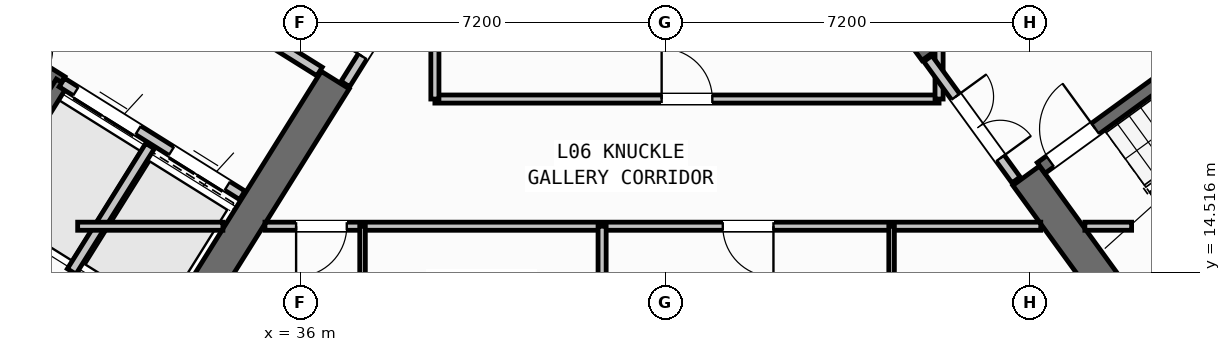
"""IFC4 building model, lengths in metres.
Left out: names, types, materials, properties, quantities, classifications, styles, units other than length and angle.
Written with IfcOpenShell. Run it as: python <this file> out.ifc"""

import sys

from ifc_helpers import new_model, si_unit, direction, frame, frame_2d, origin, place, context, subcontext, project, spatial, rectangle, extrude, source, transform, mapped, element, fill, save


model = new_model("IFC4")
c1 = context("Model", 3, precision=1e-05, world=origin(), true_north=direction((0.0, 1.0)))
c2 = subcontext(c1, "Body", "Model", "MODEL_VIEW")
j1 = project(units=[si_unit("LENGTHUNIT", "METRE"), si_unit("PLANEANGLEUNIT", "RADIAN")], contexts=[c1])
p1 = place(None, origin())
s1 = spatial("IfcSite", under=j1, at=p1, CompositionType="ELEMENT")
p2 = place(p1, origin())
s2 = spatial("IfcBuilding", under=s1, at=p2, CompositionType="ELEMENT")
p3 = place(p2, frame((0.0, 0.0, 27.6)))
s3 = spatial("IfcBuildingStorey", under=s2, at=p3, CompositionType="ELEMENT", Elevation=27.6)
p4 = place(p3, frame((33.409, 12.45, 0.0), z_axis=(0.0, 0.0, 1.0), x_axis=(-0.848051132073, 0.529914405721, 0.0)))
e1 = element("IfcWall", 1, at=p4, inside=s3, PredefinedType="SHEAR", context=c2, shape_type="SweptSolid", body=[
    extrude(rectangle(XDim=13.24, YDim=0.65, at=frame_2d((6.62, 0.0))), origin(), (0.0, 0.0, 1.0), 3.35),
])
p5 = place(p3, frame((36.683, 18.304, 0.0), z_axis=(0.0, 0.0, 1.0), x_axis=(-0.529899109053, -0.848060690178, 0.0)))
e2 = element("IfcWall", 2, at=p5, inside=s3, PredefinedType="SHEAR", context=c2, shape_type="SweptSolid", body=[
    extrude(rectangle(XDim=6.375, YDim=0.65, at=frame_2d((3.188, 0.0))), origin(), (0.0, 0.0, 1.0), 3.35),
])
p6 = place(p3, frame((52.318, 13.11, 0.0), z_axis=(0.0, 0.0, 1.0), x_axis=(0.809019445368, 0.587781878776, 0.0)))
e3 = element("IfcWall", 3, at=p6, inside=s3, PredefinedType="SHEAR", context=c2, shape_type="SweptSolid", body=[
    extrude(rectangle(XDim=12.44, YDim=0.65, at=frame_2d((6.22, 0.0))), origin(), (0.0, 0.0, 1.0), 3.35),
])
p7 = place(p3, frame((52.39, 13.564, 0.0), z_axis=(0.0, 0.0, 1.0), x_axis=(-0.58779688989, 0.809008539037, 0.0)))
e4 = element("IfcWall", 4, at=p7, inside=s3, PredefinedType="SHEAR", context=c2, shape_type="SweptSolid", body=[
    extrude(rectangle(XDim=3.525, YDim=0.65, at=frame_2d((1.763, 0.0))), origin(), (0.0, 0.0, 1.0), 3.35),
])
p8 = place(p3, frame((48.526, 18.884, 0.0), z_axis=(0.0, 0.0, 1.0), x_axis=(-0.58777996584, 0.809020835181, 0.0)))
e5 = element("IfcWall", 5, at=p8, inside=s3, PredefinedType="SHEAR", context=c2, shape_type="SweptSolid", body=[
    extrude(rectangle(XDim=6.375, YDim=0.65, at=frame_2d((3.188, 0.0))), origin(), (0.0, 0.0, 1.0), 3.35),
])
p9 = place(p3, frame((31.28, 18.261, 0.0), z_axis=(0.0, 0.0, 1.0), x_axis=(-0.848051618787, 0.529913626805, 0.0)))
e6 = element("IfcWall", 6, at=p9, inside=s3, PredefinedType="SHEAR", context=c2, shape_type="SweptSolid", body=[
    extrude(rectangle(XDim=7.46, YDim=0.26, at=frame_2d((3.73, 0.0))), origin(), (0.0, 0.0, 1.0), 3.35),
])
p10 = place(p9, frame((0.36, 0.0, 0.0)))
e7 = element("IfcOpeningElement", 7, at=p10, cuts=e6, PredefinedType="OPENING", context=c2, shape_type="SweptSolid", body=[
    extrude(rectangle(XDim=0.86, YDim=2.05, at=frame_2d((0.43, 1.025))), frame((0.0, 0.14, 0.0), z_axis=(0.0, -1.0, 0.0), x_axis=(1.0, 0.0, 0.0)), (0.0, 0.0, 1.0), 0.28),
])
p11 = place(p3, frame((31.288, 18.256, 0.0), z_axis=(0.0, 0.0, 1.0), x_axis=(-0.529943379326, -0.848033026897, 0.0)))
e8 = element("IfcWall", 8, at=p11, inside=s3, PredefinedType="SHEAR", context=c2, shape_type="SweptSolid", body=[
    extrude(rectangle(XDim=3.16, YDim=0.26, at=frame_2d((1.58, 0.0))), origin(), (0.0, 0.0, 1.0), 3.35),
])
p12 = place(p3, frame((34.848, 16.031, 0.0), z_axis=(0.0, 0.0, 1.0), x_axis=(-0.848044042236, 0.529925751807, 0.0)))
e9 = element("IfcWall", 9, at=p12, inside=s3, PredefinedType="STANDARD", context=c2, shape_type="SweptSolid", body=[
    extrude(rectangle(XDim=4.198, YDim=0.2, at=frame_2d((2.099, 0.0))), origin(), (0.0, 0.0, 1.0), 3.34),
])
p13 = place(p12, frame((0.348, 0.0, 0.0)))
e10 = element("IfcOpeningElement", 10, at=p13, cuts=e9, PredefinedType="OPENING", context=c2, shape_type="SweptSolid", body=[
    extrude(rectangle(XDim=1.3, YDim=2.2, at=frame_2d((0.65, 1.1))), frame((0.0, 0.11, 0.0), z_axis=(0.0, -1.0, 0.0), x_axis=(1.0, 0.0, 0.0)), (0.0, 0.0, 1.0), 0.22),
])
p14 = place(p12, frame((2.423, 0.0, 0.0)))
e11 = element("IfcOpeningElement", 11, at=p14, cuts=e9, PredefinedType="OPENING", context=c2, shape_type="SweptSolid", body=[
    extrude(rectangle(XDim=1.45, YDim=2.25, at=frame_2d((0.725, 1.125))), frame((0.0, 0.11, 0.0), z_axis=(0.0, -1.0, 0.0), x_axis=(1.0, 0.0, 0.0)), (0.0, 0.0, 1.0), 0.22),
])
p15 = place(p3, frame((36.374, 18.474, 0.0), z_axis=(0.0, 0.0, 1.0), x_axis=(-0.848051071577, 0.529914502535, 0.0)))
e12 = element("IfcWall", 12, at=p15, inside=s3, PredefinedType="STANDARD", context=c2, shape_type="SweptSolid", body=[
    extrude(rectangle(XDim=5.718, YDim=0.2, at=frame_2d((2.859, 0.0))), origin(), (0.0, 0.0, 1.0), 3.34),
])
p16 = place(p15, frame((2.498, 0.0, 0.0)))
e13 = element("IfcOpeningElement", 13, at=p16, cuts=e12, PredefinedType="OPENING", context=c2, shape_type="SweptSolid", body=[
    extrude(rectangle(XDim=1.15, YDim=2.1, at=frame_2d((0.575, 1.05))), frame((0.0, 0.11, 0.0), z_axis=(0.0, -1.0, 0.0), x_axis=(1.0, 0.0, 0.0)), (0.0, 0.0, 1.0), 0.22),
])
p17 = place(p3, frame((33.029, 17.003, 0.0), z_axis=(0.0, 0.0, 1.0), x_axis=(-0.529916267533, -0.848049968695, 0.0)))
e14 = element("IfcWall", 14, at=p17, inside=s3, PredefinedType="STANDARD", context=c2, shape_type="SweptSolid", body=[
    extrude(rectangle(XDim=2.92, YDim=0.2, at=frame_2d((1.46, 0.0))), origin(), (0.0, 0.0, 1.0), 3.34),
])
p18 = place(p3, frame((52.472, 14.013, 0.0), z_axis=(0.0, 0.0, 1.0), x_axis=(0.809028366311, 0.587769599847, 0.0)))
e15 = element("IfcWall", 15, at=p18, inside=s3, PredefinedType="SHEAR", context=c2, shape_type="SweptSolid", body=[
    extrude(rectangle(XDim=7.33, YDim=0.26, at=frame_2d((3.665, 0.0))), origin(), (0.0, 0.0, 1.0), 3.35),
])
p19 = place(p3, frame((50.615, 16.57, 0.0), z_axis=(0.0, 0.0, 1.0), x_axis=(0.809028366311, 0.587769599847, 0.0)))
e16 = element("IfcWall", 16, at=p19, inside=s3, PredefinedType="SHEAR", context=c2, shape_type="SweptSolid", body=[
    extrude(rectangle(XDim=7.33, YDim=0.26, at=frame_2d((3.665, 0.0))), origin(), (0.0, 0.0, 1.0), 3.35),
])
p20 = place(p19, frame((0.22, 0.0, 0.0)))
e17 = element("IfcOpeningElement", 17, at=p20, cuts=e16, PredefinedType="OPENING", context=c2, shape_type="SweptSolid", body=[
    extrude(rectangle(XDim=1.1, YDim=2.1, at=frame_2d((0.55, 1.05))), frame((0.0, 0.14, 0.0), z_axis=(0.0, -1.0, 0.0), x_axis=(1.0, 0.0, 0.0)), (0.0, 0.0, 1.0), 0.28),
])
p21 = place(p3, frame((32.164, 10.374, 0.0), z_axis=(0.0, 0.0, 1.0), x_axis=(-0.848044107957, 0.529925646633, 0.0)))
e18 = element("IfcWall", 18, at=p21, inside=s3, PredefinedType="PARTITIONING", context=c2, shape_type="SweptSolid", body=[
    extrude(rectangle(XDim=15.57, YDim=0.16, at=frame_2d((7.785, 0.0))), origin(), (0.0, 0.0, 1.0), 3.34),
])
p22 = place(p21, frame((10.83, 0.0, 0.0)))
e19 = element("IfcOpeningElement", 19, at=p22, cuts=e18, PredefinedType="OPENING", context=c2, shape_type="SweptSolid", body=[
    extrude(rectangle(XDim=1.0, YDim=2.1, at=frame_2d((0.5, 1.05))), frame((0.0, 0.09, 0.0), z_axis=(0.0, -1.0, 0.0), x_axis=(1.0, 0.0, 0.0)), (0.0, 0.0, 1.0), 0.18),
])
p23 = place(p3, frame((38.451, 20.737, 0.0), z_axis=(0.0, 0.0, 1.0), x_axis=(-0.529924799939, -0.848044637038, 0.0)))
e20 = element("IfcWall", 20, at=p23, inside=s3, PredefinedType="STANDARD", context=c2, shape_type="SweptSolid", body=[
    extrude(rectangle(XDim=2.96, YDim=0.2, at=frame_2d((1.48, 0.0))), origin(), (0.0, 0.0, 1.0), 3.34),
])
p24 = place(p23, frame((1.46, 0.0, 0.0)))
e21 = element("IfcOpeningElement", 21, at=p24, cuts=e20, PredefinedType="OPENING", context=c2, shape_type="SweptSolid", body=[
    extrude(rectangle(XDim=0.86, YDim=2.05, at=frame_2d((0.43, 1.025))), frame((0.0, 0.11, 0.0), z_axis=(0.0, -1.0, 0.0), x_axis=(1.0, 0.0, 0.0)), (0.0, 0.0, 1.0), 0.22),
])
p25 = place(p3, frame((31.6, 15.42, 0.0), z_axis=(0.0, 0.0, 1.0), x_axis=(1.0, 0.0, 0.0)))
e22 = element("IfcWall", 22, at=p25, inside=s3, PredefinedType="PARTITIONING", context=c2, shape_type="SweptSolid", body=[
    extrude(rectangle(XDim=2.866, YDim=0.16, at=frame_2d((1.433, 0.0))), origin(), (0.0, 0.0, 1.0), 3.34),
])
p26 = place(p3, frame((35.296, 15.42, 0.0), z_axis=(0.0, 0.0, 1.0), x_axis=(1.0, 0.0, 0.0)))
e23 = element("IfcWall", 23, at=p26, inside=s3, PredefinedType="PARTITIONING", context=c2, shape_type="SweptSolid", body=[
    extrude(rectangle(XDim=15.311, YDim=0.16, at=frame_2d((7.655, 0.0))), origin(), (0.0, 0.0, 1.0), 3.34),
])
p27 = place(p26, frame((0.615, 0.0, 0.0)))
e24 = element("IfcOpeningElement", 24, at=p27, cuts=e23, PredefinedType="OPENING", context=c2, shape_type="SweptSolid", body=[
    extrude(rectangle(XDim=1.0, YDim=2.1, at=frame_2d((0.5, 1.05))), frame((0.0, 0.09, 0.0), z_axis=(0.0, -1.0, 0.0), x_axis=(1.0, 0.0, 0.0)), (0.0, 0.0, 1.0), 0.18),
])
p28 = place(p26, frame((9.035, 0.0, 0.0)))
e25 = element("IfcOpeningElement", 25, at=p28, cuts=e23, PredefinedType="OPENING", context=c2, shape_type="SweptSolid", body=[
    extrude(rectangle(XDim=1.0, YDim=2.1, at=frame_2d((0.5, 1.05))), frame((0.0, 0.09, 0.0), z_axis=(0.0, -1.0, 0.0), x_axis=(1.0, 0.0, 0.0)), (0.0, 0.0, 1.0), 0.18),
])
p29 = place(p3, frame((51.477, 15.42, 0.0), z_axis=(0.0, 0.0, 1.0), x_axis=(1.0, 0.0, 0.0)))
e26 = element("IfcWall", 26, at=p29, inside=s3, PredefinedType="PARTITIONING", context=c2, shape_type="SweptSolid", body=[
    extrude(rectangle(XDim=0.923, YDim=0.16, at=frame_2d((0.461, 0.0))), origin(), (0.0, 0.0, 1.0), 3.34),
])
p30 = place(p3, frame((38.65, 17.93, 0.0), z_axis=(0.0, 0.0, 1.0), x_axis=(1.0, 0.0, 0.0)))
e27 = element("IfcWall", 27, at=p30, inside=s3, PredefinedType="PARTITIONING", context=c2, shape_type="SweptSolid", body=[
    extrude(rectangle(XDim=9.95, YDim=0.16, at=frame_2d((4.975, 0.0))), origin(), (0.0, 0.0, 1.0), 3.34),
])
p31 = place(p30, frame((4.475, 0.0, 0.0)))
e28 = element("IfcOpeningElement", 28, at=p31, cuts=e27, PredefinedType="OPENING", context=c2, shape_type="SweptSolid", body=[
    extrude(rectangle(XDim=1.0, YDim=2.1, at=frame_2d((0.5, 1.05))), frame((0.0, 0.09, 0.0), z_axis=(0.0, -1.0, 0.0), x_axis=(1.0, 0.0, 0.0)), (0.0, 0.0, 1.0), 0.18),
])
p32 = place(p3, frame((38.65, 17.93, 0.0), z_axis=(0.0, 0.0, 1.0), x_axis=(0.0, 1.0, 0.0)))
e29 = element("IfcWall", 29, at=p32, inside=s3, PredefinedType="PARTITIONING", context=c2, shape_type="SweptSolid", body=[
    extrude(rectangle(XDim=2.857, YDim=0.16, at=frame_2d((1.428, 0.0))), origin(), (0.0, 0.0, 1.0), 3.34),
])
p33 = place(p3, frame((48.6, 17.93, 0.0), z_axis=(0.0, 0.0, 1.0), x_axis=(0.0, 1.0, 0.0)))
e30 = element("IfcWall", 30, at=p33, inside=s3, PredefinedType="PARTITIONING", context=c2, shape_type="SweptSolid", body=[
    extrude(rectangle(XDim=0.993, YDim=0.16, at=frame_2d((0.496, 0.0))), origin(), (0.0, 0.0, 1.0), 3.34),
])
p34 = place(p3, frame((50.119, 16.333, 0.0), z_axis=(0.0, 0.0, 1.0), x_axis=(-0.587749856981, 0.809042709391, 0.0)))
e31 = element("IfcWall", 31, at=p34, inside=s3, PredefinedType="STANDARD", context=c2, shape_type="SweptSolid", body=[
    extrude(rectangle(XDim=2.96, YDim=0.2, at=frame_2d((1.48, 0.0))), origin(), (0.0, 0.0, 1.0), 3.34),
])
p35 = place(p34, frame((0.53, 0.0, 0.0)))
e32 = element("IfcOpeningElement", 32, at=p35, cuts=e31, PredefinedType="OPENING", context=c2, shape_type="SweptSolid", body=[
    extrude(rectangle(XDim=1.5, YDim=2.15, at=frame_2d((0.75, 1.075))), frame((0.0, 0.11, 0.0), z_axis=(0.0, -1.0, 0.0), x_axis=(1.0, 0.0, 0.0)), (0.0, 0.0, 1.0), 0.22),
])
p36 = place(p3, frame((41.95, 1.96, 0.0), z_axis=(0.0, 0.0, 1.0), x_axis=(0.0, 1.0, 0.0)))
e33 = element("IfcWall", 33, at=p36, inside=s3, PredefinedType="PARTITIONING", context=c2, shape_type="SweptSolid", body=[
    extrude(rectangle(XDim=13.46, YDim=0.16, at=frame_2d((6.73, 0.0))), origin(), (0.0, 0.0, 1.0), 3.34),
])
p37 = place(p3, frame((37.222, 1.96, 0.0), z_axis=(0.0, 0.0, 1.0), x_axis=(0.0, 1.0, 0.0)))
e34 = element("IfcWall", 34, at=p37, inside=s3, PredefinedType="PARTITIONING", context=c2, shape_type="SweptSolid", body=[
    extrude(rectangle(XDim=13.46, YDim=0.11, at=frame_2d((6.73, 0.0))), origin(), (0.0, 0.0, 1.0), 3.34),
])
p38 = place(p37, frame((5.2, 0.0, 0.0)))
e35 = element("IfcOpeningElement", 35, at=p38, cuts=e34, PredefinedType="OPENING", context=c2, shape_type="SweptSolid", body=[
    extrude(rectangle(XDim=0.92, YDim=2.08, at=frame_2d((0.46, 1.04))), frame((0.0, 0.065, 0.0), z_axis=(0.0, -1.0, 0.0), x_axis=(1.0, 0.0, 0.0)), (0.0, 0.0, 1.0), 0.13),
])
p39 = place(p37, frame((10.45, 0.0, 0.0)))
e36 = element("IfcOpeningElement", 36, at=p39, cuts=e34, PredefinedType="OPENING", context=c2, shape_type="SweptSolid", body=[
    extrude(rectangle(XDim=0.88, YDim=2.08, at=frame_2d((0.44, 1.04))), frame((0.0, 0.065, 0.0), z_axis=(0.0, -1.0, 0.0), x_axis=(1.0, 0.0, 0.0)), (0.0, 0.0, 1.0), 0.13),
])
p40 = place(p3, frame((47.663, 1.96, 0.0), z_axis=(0.0, 0.0, 1.0), x_axis=(0.0, 1.0, 0.0)))
e37 = element("IfcWall", 37, at=p40, inside=s3, PredefinedType="PARTITIONING", context=c2, shape_type="SweptSolid", body=[
    extrude(rectangle(XDim=13.46, YDim=0.11, at=frame_2d((6.73, 0.0))), origin(), (0.0, 0.0, 1.0), 3.34),
])
p41 = place(p40, frame((6.3, 0.0, 0.0)))
e38 = element("IfcOpeningElement", 38, at=p41, cuts=e37, PredefinedType="OPENING", context=c2, shape_type="SweptSolid", body=[
    extrude(rectangle(XDim=0.92, YDim=2.08, at=frame_2d((0.46, 1.04))), frame((0.0, 0.065, 0.0), z_axis=(0.0, -1.0, 0.0), x_axis=(1.0, 0.0, 0.0)), (0.0, 0.0, 1.0), 0.13),
])
p42 = place(p40, frame((11.1, 0.0, 0.0)))
e39 = element("IfcOpeningElement", 39, at=p42, cuts=e37, PredefinedType="OPENING", context=c2, shape_type="SweptSolid", body=[
    extrude(rectangle(XDim=0.88, YDim=2.08, at=frame_2d((0.44, 1.04))), frame((0.0, 0.065, 0.0), z_axis=(0.0, -1.0, 0.0), x_axis=(1.0, 0.0, 0.0)), (0.0, 0.0, 1.0), 0.13),
])
m1 = source(origin(), c2, "Body", "SweptSolid", [
    extrude(rectangle(XDim=1.3, YDim=2.2, at=frame_2d((0.65, 1.1))), frame((0.0, 0.025, 0.0), z_axis=(0.0, -1.0, 0.0), x_axis=(1.0, 0.0, 0.0)), (0.0, 0.0, 1.0), 0.05),
])
p43 = place(p13, origin())
e40 = element("IfcDoor", 40, at=p43, inside=s3, OperationType="DOUBLE_DOOR_SLIDING", PredefinedType="DOOR", context=c2, shape_type="MappedRepresentation", body=[
    mapped(m1, transform((0.0, 0.0, 0.0), scale=1.0)),
])
fill(e10, e40)
m2 = source(origin(), c2, "Body", "SweptSolid", [
    extrude(rectangle(XDim=1.45, YDim=2.25, at=frame_2d((0.725, 1.125))), frame((0.0, 0.025, 0.0), z_axis=(0.0, -1.0, 0.0), x_axis=(1.0, 0.0, 0.0)), (0.0, 0.0, 1.0), 0.05),
])
p44 = place(p14, origin())
e41 = element("IfcDoor", 41, at=p44, inside=s3, OperationType="DOUBLE_DOOR_SLIDING", PredefinedType="DOOR", context=c2, shape_type="MappedRepresentation", body=[
    mapped(m2, transform((0.0, 0.0, 0.0), scale=1.0)),
])
fill(e11, e41)
m3 = source(origin(), c2, "Body", "SweptSolid", [
    extrude(rectangle(XDim=1.1, YDim=2.1, at=frame_2d((0.55, 1.05))), frame((0.0, 0.025, 0.0), z_axis=(0.0, -1.0, 0.0), x_axis=(1.0, 0.0, 0.0)), (0.0, 0.0, 1.0), 0.05),
])
p45 = place(p20, origin())
e42 = element("IfcDoor", 42, at=p45, inside=s3, OperationType="SINGLE_SWING_RIGHT", PredefinedType="DOOR", context=c2, shape_type="MappedRepresentation", body=[
    mapped(m3, transform((0.0, 0.0, 0.0), scale=1.0)),
])
fill(e17, e42)
m4 = source(origin(), c2, "Body", "SweptSolid", [
    extrude(rectangle(XDim=1.0, YDim=2.1, at=frame_2d((0.5, 1.05))), frame((0.0, 0.025, 0.0), z_axis=(0.0, -1.0, 0.0), x_axis=(1.0, 0.0, 0.0)), (0.0, 0.0, 1.0), 0.05),
])
p46 = place(p31, origin())
e43 = element("IfcDoor", 43, at=p46, inside=s3, OperationType="SINGLE_SWING_LEFT", PredefinedType="DOOR", context=c2, shape_type="MappedRepresentation", body=[
    mapped(m4, transform((0.0, 0.0, 0.0), scale=1.0)),
])
fill(e28, e43)
m5 = source(origin(), c2, "Body", "SweptSolid", [
    extrude(rectangle(XDim=0.86, YDim=2.05, at=frame_2d((0.43, 1.025))), frame((0.0, 0.025, 0.0), z_axis=(0.0, -1.0, 0.0), x_axis=(1.0, 0.0, 0.0)), (0.0, 0.0, 1.0), 0.05),
])
p47 = place(p24, frame((0.86, 0.0, 0.0), z_axis=(0.0, 0.0, 1.0), x_axis=(-1.0, 0.0, 0.0)))
e44 = element("IfcDoor", 44, at=p47, inside=s3, OperationType="SINGLE_SWING_LEFT", PredefinedType="DOOR", context=c2, shape_type="MappedRepresentation", body=[
    mapped(m5, transform((0.0, 0.0, 0.0), scale=1.0)),
])
fill(e21, e44)
m6 = source(origin(), c2, "Body", "SweptSolid", [
    extrude(rectangle(XDim=1.5, YDim=2.15, at=frame_2d((0.75, 1.075))), frame((0.0, 0.025, 0.0), z_axis=(0.0, -1.0, 0.0), x_axis=(1.0, 0.0, 0.0)), (0.0, 0.0, 1.0), 0.05),
])
p48 = place(p35, frame((1.5, 0.0, 0.0), z_axis=(0.0, 0.0, 1.0), x_axis=(-1.0, 0.0, 0.0)))
e45 = element("IfcDoor", 45, at=p48, inside=s3, OperationType="DOUBLE_DOOR_SINGLE_SWING", PredefinedType="DOOR", context=c2, shape_type="MappedRepresentation", body=[
    mapped(m6, transform((0.0, 0.0, 0.0), scale=1.0)),
])
fill(e32, e45)
p49 = place(p27, frame((1.0, 0.0, 0.0), z_axis=(0.0, 0.0, 1.0), x_axis=(-1.0, 0.0, 0.0)))
e46 = element("IfcDoor", 46, at=p49, inside=s3, OperationType="SINGLE_SWING_RIGHT", PredefinedType="DOOR", context=c2, shape_type="MappedRepresentation", body=[
    mapped(m4, transform((0.0, 0.0, 0.0), scale=1.0)),
])
fill(e24, e46)
p50 = place(p28, frame((1.0, 0.0, 0.0), z_axis=(0.0, 0.0, 1.0), x_axis=(-1.0, 0.0, 0.0)))
e47 = element("IfcDoor", 47, at=p50, inside=s3, OperationType="SINGLE_SWING_LEFT", PredefinedType="DOOR", context=c2, shape_type="MappedRepresentation", body=[
    mapped(m4, transform((0.0, 0.0, 0.0), scale=1.0)),
])
fill(e25, e47)
save(model, sys.argv[1])
